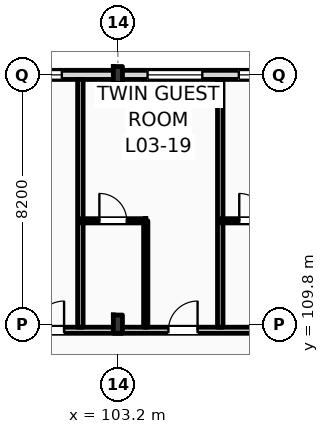
"""IFC4 building model, lengths in metres.
Left out: names, types, materials, properties, quantities, classifications, styles, units other than length and angle.
Written with IfcOpenShell. Run it as: python <this file> out.ifc"""

import sys

from ifc_helpers import new_model, si_unit, direction, frame, frame_2d, origin, origin_2d, place, context, subcontext, project, spatial, rectangle, i_section, extrude, element, fill, save


model = new_model("IFC4")
c1 = context("Model", 3, precision=1e-05, world=origin(), true_north=direction((0.0, 1.0)))
c2 = subcontext(c1, "Body", "Model", "MODEL_VIEW")
j1 = project(units=[si_unit("LENGTHUNIT", "METRE"), si_unit("PLANEANGLEUNIT", "RADIAN")], contexts=[c1])
p1 = place(None, origin())
s1 = spatial("IfcSite", under=j1, at=p1, CompositionType="ELEMENT")
p2 = place(p1, origin())
s2 = spatial("IfcBuilding", under=s1, at=p2, CompositionType="ELEMENT")
p3 = place(p2, frame((0.0, 0.0, 16.2)))
s3 = spatial("IfcBuildingStorey", under=s2, at=p3, CompositionType="ELEMENT", Elevation=16.2)
p4 = place(p3, frame((103.2, 109.8, 0.0), z_axis=(0.0, 0.0, 1.0), x_axis=(1.0, 0.0, 0.0)))
e1 = element("IfcColumn", 1, at=p4, inside=s3, PredefinedType="COLUMN", context=c2, shape_type="SweptSolid", body=[
    extrude(i_section(OverallWidth=0.3, OverallDepth=0.6, WebThickness=0.015, FlangeThickness=0.03, FilletRadius=0.027, at=origin_2d()), origin(), (0.0, 0.0, 1.0), 4.2),
])
p5 = place(p3, frame((103.2, 118.0, 0.0), z_axis=(0.0, 0.0, 1.0), x_axis=(1.0, 0.0, 0.0)))
e2 = element("IfcColumn", 2, at=p5, inside=s3, PredefinedType="COLUMN", context=c2, shape_type="SweptSolid", body=[
    extrude(i_section(OverallWidth=0.3, OverallDepth=0.55, WebThickness=0.015, FlangeThickness=0.029, FilletRadius=0.027, at=origin_2d()), origin(), (0.0, 0.0, 1.0), 4.2),
])
p6 = place(p3, frame((22.5, 118.0, 0.0), z_axis=(0.0, 0.0, 1.0), x_axis=(1.0, 0.0, 0.0)))
e3 = element("IfcWall", 3, at=p6, inside=s3, PredefinedType="STANDARD", context=c2, shape_type="SweptSolid", body=[
    extrude(rectangle(XDim=97.5, YDim=0.3, at=frame_2d((48.75, 0.0))), origin(), (0.0, 0.0, 1.0), 3.36),
])
p7 = place(p6, frame((3.721, 0.0, 0.9)))
e4 = element("IfcOpeningElement", 4, at=p7, cuts=e3, PredefinedType="OPENING", context=c2, shape_type="SweptSolid", body=[
    extrude(rectangle(XDim=0.9, YDim=1.8, at=frame_2d((0.45, 0.9))), frame((0.0, 0.16, 0.0), z_axis=(0.0, -1.0, 0.0), x_axis=(1.0, 0.0, 0.0)), (0.0, 0.0, 1.0), 0.32),
])
p8 = place(p6, frame((6.447, 0.0, 0.9)))
e5 = element("IfcOpeningElement", 5, at=p8, cuts=e3, PredefinedType="OPENING", context=c2, shape_type="SweptSolid", body=[
    extrude(rectangle(XDim=1.35, YDim=1.85, at=frame_2d((0.675, 0.925))), frame((0.0, 0.16, 0.0), z_axis=(0.0, -1.0, 0.0), x_axis=(1.0, 0.0, 0.0)), (0.0, 0.0, 1.0), 0.32),
])
p9 = place(p6, frame((11.363, 0.0, 0.9)))
e6 = element("IfcOpeningElement", 6, at=p9, cuts=e3, PredefinedType="OPENING", context=c2, shape_type="SweptSolid", body=[
    extrude(rectangle(XDim=1.5, YDim=1.9, at=frame_2d((0.75, 0.95))), frame((0.0, 0.16, 0.0), z_axis=(0.0, -1.0, 0.0), x_axis=(1.0, 0.0, 0.0)), (0.0, 0.0, 1.0), 0.32),
])
p10 = place(p6, frame((15.078, 0.0, 0.9)))
e7 = element("IfcOpeningElement", 7, at=p10, cuts=e3, PredefinedType="OPENING", context=c2, shape_type="SweptSolid", body=[
    extrude(rectangle(XDim=1.65, YDim=1.95, at=frame_2d((0.825, 0.975))), frame((0.0, 0.16, 0.0), z_axis=(0.0, -1.0, 0.0), x_axis=(1.0, 0.0, 0.0)), (0.0, 0.0, 1.0), 0.32),
])
p11 = place(p6, frame((19.395, 0.0, 0.9)))
e8 = element("IfcOpeningElement", 8, at=p11, cuts=e3, PredefinedType="OPENING", context=c2, shape_type="SweptSolid", body=[
    extrude(rectangle(XDim=1.8, YDim=2.0, at=frame_2d((0.9, 1.0))), frame((0.0, 0.16, 0.0), z_axis=(0.0, -1.0, 0.0), x_axis=(1.0, 0.0, 0.0)), (0.0, 0.0, 1.0), 0.32),
])
p12 = place(p6, frame((23.31, 0.0, 0.9)))
e9 = element("IfcOpeningElement", 9, at=p12, cuts=e3, PredefinedType="OPENING", context=c2, shape_type="SweptSolid", body=[
    extrude(rectangle(XDim=1.95, YDim=2.05, at=frame_2d((0.975, 1.025))), frame((0.0, 0.16, 0.0), z_axis=(0.0, -1.0, 0.0), x_axis=(1.0, 0.0, 0.0)), (0.0, 0.0, 1.0), 0.32),
])
p13 = place(p6, frame((28.026, 0.0, 0.9)))
e10 = element("IfcOpeningElement", 10, at=p13, cuts=e3, PredefinedType="OPENING", context=c2, shape_type="SweptSolid", body=[
    extrude(rectangle(XDim=2.1, YDim=2.1, at=frame_2d((1.05, 1.05))), frame((0.0, 0.16, 0.0), z_axis=(0.0, -1.0, 0.0), x_axis=(1.0, 0.0, 0.0)), (0.0, 0.0, 1.0), 0.32),
])
p14 = place(p6, frame((31.941, 0.0, 0.9)))
e11 = element("IfcOpeningElement", 11, at=p14, cuts=e3, PredefinedType="OPENING", context=c2, shape_type="SweptSolid", body=[
    extrude(rectangle(XDim=1.1, YDim=2.15, at=frame_2d((0.55, 1.075))), frame((0.0, 0.16, 0.0), z_axis=(0.0, -1.0, 0.0), x_axis=(1.0, 0.0, 0.0)), (0.0, 0.0, 1.0), 0.32),
])
p15 = place(p6, frame((36.657, 0.0, 0.9)))
e12 = element("IfcOpeningElement", 12, at=p15, cuts=e3, PredefinedType="OPENING", context=c2, shape_type="SweptSolid", body=[
    extrude(rectangle(XDim=2.4, YDim=2.2, at=frame_2d((1.2, 1.1))), frame((0.0, 0.16, 0.0), z_axis=(0.0, -1.0, 0.0), x_axis=(1.0, 0.0, 0.0)), (0.0, 0.0, 1.0), 0.32),
])
p16 = place(p6, frame((42.574, 0.0, 0.9)))
e13 = element("IfcOpeningElement", 13, at=p16, cuts=e3, PredefinedType="OPENING", context=c2, shape_type="SweptSolid", body=[
    extrude(rectangle(XDim=1.35, YDim=2.25, at=frame_2d((0.675, 1.125))), frame((0.0, 0.16, 0.0), z_axis=(0.0, -1.0, 0.0), x_axis=(1.0, 0.0, 0.0)), (0.0, 0.0, 1.0), 0.32),
])
p17 = place(p6, frame((45.289, 0.0, 0.9)))
e14 = element("IfcOpeningElement", 14, at=p17, cuts=e3, PredefinedType="OPENING", context=c2, shape_type="SweptSolid", body=[
    extrude(rectangle(XDim=2.7, YDim=2.28, at=frame_2d((1.35, 1.14))), frame((0.0, 0.16, 0.0), z_axis=(0.0, -1.0, 0.0), x_axis=(1.0, 0.0, 0.0)), (0.0, 0.0, 1.0), 0.32),
])
p18 = place(p6, frame((50.406, 0.0, 0.9)))
e15 = element("IfcOpeningElement", 15, at=p18, cuts=e3, PredefinedType="OPENING", context=c2, shape_type="SweptSolid", body=[
    extrude(rectangle(XDim=1.8, YDim=2.28, at=frame_2d((0.9, 1.14))), frame((0.0, 0.16, 0.0), z_axis=(0.0, -1.0, 0.0), x_axis=(1.0, 0.0, 0.0)), (0.0, 0.0, 1.0), 0.32),
])
p19 = place(p6, frame((53.922, 0.0, 0.9)))
e16 = element("IfcOpeningElement", 16, at=p19, cuts=e3, PredefinedType="OPENING", context=c2, shape_type="SweptSolid", body=[
    extrude(rectangle(XDim=1.8, YDim=2.28, at=frame_2d((0.9, 1.14))), frame((0.0, 0.16, 0.0), z_axis=(0.0, -1.0, 0.0), x_axis=(1.0, 0.0, 0.0)), (0.0, 0.0, 1.0), 0.32),
])
p20 = place(p6, frame((58.332, 0.0, 0.9)))
e17 = element("IfcOpeningElement", 17, at=p20, cuts=e3, PredefinedType="OPENING", context=c2, shape_type="SweptSolid", body=[
    extrude(rectangle(XDim=2.961, YDim=2.28, at=frame_2d((1.48, 1.14))), frame((0.0, 0.16, 0.0), z_axis=(0.0, -1.0, 0.0), x_axis=(1.0, 0.0, 0.0)), (0.0, 0.0, 1.0), 0.32),
])
p21 = place(p6, frame((62.513, 0.0, 0.9)))
e18 = element("IfcOpeningElement", 18, at=p21, cuts=e3, PredefinedType="OPENING", context=c2, shape_type="SweptSolid", body=[
    extrude(rectangle(XDim=1.8, YDim=2.28, at=frame_2d((0.9, 1.14))), frame((0.0, 0.16, 0.0), z_axis=(0.0, -1.0, 0.0), x_axis=(1.0, 0.0, 0.0)), (0.0, 0.0, 1.0), 0.32),
])
p22 = place(p6, frame((67.114, 0.0, 0.9)))
e19 = element("IfcOpeningElement", 19, at=p22, cuts=e3, PredefinedType="OPENING", context=c2, shape_type="SweptSolid", body=[
    extrude(rectangle(XDim=2.961, YDim=2.28, at=frame_2d((1.48, 1.14))), frame((0.0, 0.16, 0.0), z_axis=(0.0, -1.0, 0.0), x_axis=(1.0, 0.0, 0.0)), (0.0, 0.0, 1.0), 0.32),
])
p23 = place(p6, frame((73.695, 0.0, 0.9)))
e20 = element("IfcOpeningElement", 20, at=p23, cuts=e3, PredefinedType="OPENING", context=c2, shape_type="SweptSolid", body=[
    extrude(rectangle(XDim=1.1, YDim=2.28, at=frame_2d((0.55, 1.14))), frame((0.0, 0.16, 0.0), z_axis=(0.0, -1.0, 0.0), x_axis=(1.0, 0.0, 0.0)), (0.0, 0.0, 1.0), 0.32),
])
p24 = place(p6, frame((75.895, 0.0, 0.9)))
e21 = element("IfcOpeningElement", 21, at=p24, cuts=e3, PredefinedType="OPENING", context=c2, shape_type="SweptSolid", body=[
    extrude(rectangle(XDim=2.961, YDim=2.28, at=frame_2d((1.48, 1.14))), frame((0.0, 0.16, 0.0), z_axis=(0.0, -1.0, 0.0), x_axis=(1.0, 0.0, 0.0)), (0.0, 0.0, 1.0), 0.32),
])
p25 = place(p6, frame((81.676, 0.0, 0.9)))
e22 = element("IfcOpeningElement", 22, at=p25, cuts=e3, PredefinedType="OPENING", context=c2, shape_type="SweptSolid", body=[
    extrude(rectangle(XDim=1.8, YDim=2.28, at=frame_2d((0.9, 1.14))), frame((0.0, 0.16, 0.0), z_axis=(0.0, -1.0, 0.0), x_axis=(1.0, 0.0, 0.0)), (0.0, 0.0, 1.0), 0.32),
])
p26 = place(p6, frame((84.677, 0.0, 0.9)))
e23 = element("IfcOpeningElement", 23, at=p26, cuts=e3, PredefinedType="OPENING", context=c2, shape_type="SweptSolid", body=[
    extrude(rectangle(XDim=2.961, YDim=2.28, at=frame_2d((1.48, 1.14))), frame((0.0, 0.16, 0.0), z_axis=(0.0, -1.0, 0.0), x_axis=(1.0, 0.0, 0.0)), (0.0, 0.0, 1.0), 0.32),
])
p27 = place(p6, frame((89.999, 0.0, 0.9)))
e24 = element("IfcOpeningElement", 24, at=p27, cuts=e3, PredefinedType="OPENING", context=c2, shape_type="SweptSolid", body=[
    extrude(rectangle(XDim=1.1, YDim=1.5, at=frame_2d((0.55, 0.75))), frame((0.0, 0.16, 0.0), z_axis=(0.0, -1.0, 0.0), x_axis=(1.0, 0.0, 0.0)), (0.0, 0.0, 1.0), 0.32),
])
p28 = place(p6, frame((94.35, 0.0, 0.9)))
e25 = element("IfcOpeningElement", 25, at=p28, cuts=e3, PredefinedType="OPENING", context=c2, shape_type="SweptSolid", body=[
    extrude(rectangle(XDim=1.25, YDim=1.6, at=frame_2d((0.625, 0.8))), frame((0.0, 0.16, 0.0), z_axis=(0.0, -1.0, 0.0), x_axis=(1.0, 0.0, 0.0)), (0.0, 0.0, 1.0), 0.32),
])
p29 = place(p3, frame((10.65, 109.6, 0.0), z_axis=(0.0, 0.0, 1.0), x_axis=(1.0, 0.0, 0.0)))
e26 = element("IfcWall", 26, at=p29, inside=s3, PredefinedType="PARTITIONING", context=c2, shape_type="SweptSolid", body=[
    extrude(rectangle(XDim=109.21, YDim=0.2, at=frame_2d((54.605, 0.0))), origin(), (0.0, 0.0, 1.0), 3.36),
])
p30 = place(p29, frame((15.43, 0.0, 0.0)))
e27 = element("IfcOpeningElement", 27, at=p30, cuts=e26, PredefinedType="OPENING", context=c2, shape_type="SweptSolid", body=[
    extrude(rectangle(XDim=1.02, YDim=2.2, at=frame_2d((0.51, 1.1))), frame((0.0, 0.11, 0.0), z_axis=(0.0, -1.0, 0.0), x_axis=(1.0, 0.0, 0.0)), (0.0, 0.0, 1.0), 0.22),
])
p31 = place(p29, frame((19.537, 0.0, 0.0)))
e28 = element("IfcOpeningElement", 28, at=p31, cuts=e26, PredefinedType="OPENING", context=c2, shape_type="SweptSolid", body=[
    extrude(rectangle(XDim=1.02, YDim=2.2, at=frame_2d((0.51, 1.1))), frame((0.0, 0.11, 0.0), z_axis=(0.0, -1.0, 0.0), x_axis=(1.0, 0.0, 0.0)), (0.0, 0.0, 1.0), 0.22),
])
p32 = place(p29, frame((23.928, 0.0, 0.0)))
e29 = element("IfcOpeningElement", 29, at=p32, cuts=e26, PredefinedType="OPENING", context=c2, shape_type="SweptSolid", body=[
    extrude(rectangle(XDim=1.02, YDim=2.2, at=frame_2d((0.51, 1.1))), frame((0.0, 0.11, 0.0), z_axis=(0.0, -1.0, 0.0), x_axis=(1.0, 0.0, 0.0)), (0.0, 0.0, 1.0), 0.22),
])
p33 = place(p29, frame((26.169, 0.0, 0.0)))
e30 = element("IfcOpeningElement", 30, at=p33, cuts=e26, PredefinedType="OPENING", context=c2, shape_type="SweptSolid", body=[
    extrude(rectangle(XDim=1.02, YDim=2.2, at=frame_2d((0.51, 1.1))), frame((0.0, 0.11, 0.0), z_axis=(0.0, -1.0, 0.0), x_axis=(1.0, 0.0, 0.0)), (0.0, 0.0, 1.0), 0.22),
])
p34 = place(p29, frame((32.739, 0.0, 0.0)))
e31 = element("IfcOpeningElement", 31, at=p34, cuts=e26, PredefinedType="OPENING", context=c2, shape_type="SweptSolid", body=[
    extrude(rectangle(XDim=0.96, YDim=2.2, at=frame_2d((0.48, 1.1))), frame((0.0, 0.11, 0.0), z_axis=(0.0, -1.0, 0.0), x_axis=(1.0, 0.0, 0.0)), (0.0, 0.0, 1.0), 0.22),
])
p35 = place(p29, frame((34.98, 0.0, 0.0)))
e32 = element("IfcOpeningElement", 32, at=p35, cuts=e26, PredefinedType="OPENING", context=c2, shape_type="SweptSolid", body=[
    extrude(rectangle(XDim=0.96, YDim=2.2, at=frame_2d((0.48, 1.1))), frame((0.0, 0.11, 0.0), z_axis=(0.0, -1.0, 0.0), x_axis=(1.0, 0.0, 0.0)), (0.0, 0.0, 1.0), 0.22),
])
p36 = place(p29, frame((41.521, 0.0, 0.0)))
e33 = element("IfcOpeningElement", 33, at=p36, cuts=e26, PredefinedType="OPENING", context=c2, shape_type="SweptSolid", body=[
    extrude(rectangle(XDim=0.96, YDim=2.2, at=frame_2d((0.48, 1.1))), frame((0.0, 0.11, 0.0), z_axis=(0.0, -1.0, 0.0), x_axis=(1.0, 0.0, 0.0)), (0.0, 0.0, 1.0), 0.22),
])
p37 = place(p29, frame((43.512, 0.0, 0.0)))
e34 = element("IfcOpeningElement", 34, at=p37, cuts=e26, PredefinedType="OPENING", context=c2, shape_type="SweptSolid", body=[
    extrude(rectangle(XDim=0.96, YDim=2.2, at=frame_2d((0.48, 1.1))), frame((0.0, 0.11, 0.0), z_axis=(0.0, -1.0, 0.0), x_axis=(1.0, 0.0, 0.0)), (0.0, 0.0, 1.0), 0.22),
])
p38 = place(p29, frame((50.303, 0.0, 0.0)))
e35 = element("IfcOpeningElement", 35, at=p38, cuts=e26, PredefinedType="OPENING", context=c2, shape_type="SweptSolid", body=[
    extrude(rectangle(XDim=0.96, YDim=2.2, at=frame_2d((0.48, 1.1))), frame((0.0, 0.11, 0.0), z_axis=(0.0, -1.0, 0.0), x_axis=(1.0, 0.0, 0.0)), (0.0, 0.0, 1.0), 0.22),
])
p39 = place(p29, frame((54.944, 0.0, 0.0)))
e36 = element("IfcOpeningElement", 36, at=p39, cuts=e26, PredefinedType="OPENING", context=c2, shape_type="SweptSolid", body=[
    extrude(rectangle(XDim=0.96, YDim=2.2, at=frame_2d((0.48, 1.1))), frame((0.0, 0.11, 0.0), z_axis=(0.0, -1.0, 0.0), x_axis=(1.0, 0.0, 0.0)), (0.0, 0.0, 1.0), 0.22),
])
p40 = place(p29, frame((59.085, 0.0, 0.0)))
e37 = element("IfcOpeningElement", 37, at=p40, cuts=e26, PredefinedType="OPENING", context=c2, shape_type="SweptSolid", body=[
    extrude(rectangle(XDim=0.96, YDim=2.2, at=frame_2d((0.48, 1.1))), frame((0.0, 0.11, 0.0), z_axis=(0.0, -1.0, 0.0), x_axis=(1.0, 0.0, 0.0)), (0.0, 0.0, 1.0), 0.22),
])
p41 = place(p29, frame((63.476, 0.0, 0.0)))
e38 = element("IfcOpeningElement", 38, at=p41, cuts=e26, PredefinedType="OPENING", context=c2, shape_type="SweptSolid", body=[
    extrude(rectangle(XDim=0.96, YDim=2.2, at=frame_2d((0.48, 1.1))), frame((0.0, 0.11, 0.0), z_axis=(0.0, -1.0, 0.0), x_axis=(1.0, 0.0, 0.0)), (0.0, 0.0, 1.0), 0.22),
])
p42 = place(p29, frame((65.716, 0.0, 0.0)))
e39 = element("IfcOpeningElement", 39, at=p42, cuts=e26, PredefinedType="OPENING", context=c2, shape_type="SweptSolid", body=[
    extrude(rectangle(XDim=0.96, YDim=2.2, at=frame_2d((0.48, 1.1))), frame((0.0, 0.11, 0.0), z_axis=(0.0, -1.0, 0.0), x_axis=(1.0, 0.0, 0.0)), (0.0, 0.0, 1.0), 0.22),
])
p43 = place(p29, frame((72.257, 0.0, 0.0)))
e40 = element("IfcOpeningElement", 40, at=p43, cuts=e26, PredefinedType="OPENING", context=c2, shape_type="SweptSolid", body=[
    extrude(rectangle(XDim=0.96, YDim=2.2, at=frame_2d((0.48, 1.1))), frame((0.0, 0.11, 0.0), z_axis=(0.0, -1.0, 0.0), x_axis=(1.0, 0.0, 0.0)), (0.0, 0.0, 1.0), 0.22),
])
p44 = place(p29, frame((74.498, 0.0, 0.0)))
e41 = element("IfcOpeningElement", 41, at=p44, cuts=e26, PredefinedType="OPENING", context=c2, shape_type="SweptSolid", body=[
    extrude(rectangle(XDim=0.96, YDim=2.2, at=frame_2d((0.48, 1.1))), frame((0.0, 0.11, 0.0), z_axis=(0.0, -1.0, 0.0), x_axis=(1.0, 0.0, 0.0)), (0.0, 0.0, 1.0), 0.22),
])
p45 = place(p29, frame((81.039, 0.0, 0.0)))
e42 = element("IfcOpeningElement", 42, at=p45, cuts=e26, PredefinedType="OPENING", context=c2, shape_type="SweptSolid", body=[
    extrude(rectangle(XDim=0.96, YDim=2.2, at=frame_2d((0.48, 1.1))), frame((0.0, 0.11, 0.0), z_axis=(0.0, -1.0, 0.0), x_axis=(1.0, 0.0, 0.0)), (0.0, 0.0, 1.0), 0.22),
])
p46 = place(p29, frame((85.68, 0.0, 0.0)))
e43 = element("IfcOpeningElement", 43, at=p46, cuts=e26, PredefinedType="OPENING", context=c2, shape_type="SweptSolid", body=[
    extrude(rectangle(XDim=0.96, YDim=2.2, at=frame_2d((0.48, 1.1))), frame((0.0, 0.11, 0.0), z_axis=(0.0, -1.0, 0.0), x_axis=(1.0, 0.0, 0.0)), (0.0, 0.0, 1.0), 0.22),
])
p47 = place(p29, frame((89.82, 0.0, 0.0)))
e44 = element("IfcOpeningElement", 44, at=p47, cuts=e26, PredefinedType="OPENING", context=c2, shape_type="SweptSolid", body=[
    extrude(rectangle(XDim=0.96, YDim=2.2, at=frame_2d((0.48, 1.1))), frame((0.0, 0.11, 0.0), z_axis=(0.0, -1.0, 0.0), x_axis=(1.0, 0.0, 0.0)), (0.0, 0.0, 1.0), 0.22),
])
p48 = place(p29, frame((94.211, 0.0, 0.0)))
e45 = element("IfcOpeningElement", 45, at=p48, cuts=e26, PredefinedType="OPENING", context=c2, shape_type="SweptSolid", body=[
    extrude(rectangle(XDim=0.96, YDim=2.2, at=frame_2d((0.48, 1.1))), frame((0.0, 0.11, 0.0), z_axis=(0.0, -1.0, 0.0), x_axis=(1.0, 0.0, 0.0)), (0.0, 0.0, 1.0), 0.22),
])
p49 = place(p29, frame((98.602, 0.0, 0.0)))
e46 = element("IfcOpeningElement", 46, at=p49, cuts=e26, PredefinedType="OPENING", context=c2, shape_type="SweptSolid", body=[
    extrude(rectangle(XDim=0.96, YDim=2.2, at=frame_2d((0.48, 1.1))), frame((0.0, 0.11, 0.0), z_axis=(0.0, -1.0, 0.0), x_axis=(1.0, 0.0, 0.0)), (0.0, 0.0, 1.0), 0.22),
])
p50 = place(p29, frame((102.993, 0.0, 0.0)))
e47 = element("IfcOpeningElement", 47, at=p50, cuts=e26, PredefinedType="OPENING", context=c2, shape_type="SweptSolid", body=[
    extrude(rectangle(XDim=0.96, YDim=2.2, at=frame_2d((0.48, 1.1))), frame((0.0, 0.11, 0.0), z_axis=(0.0, -1.0, 0.0), x_axis=(1.0, 0.0, 0.0)), (0.0, 0.0, 1.0), 0.22),
])
p51 = place(p29, frame((105.269, 0.0, 0.0)))
e48 = element("IfcOpeningElement", 48, at=p51, cuts=e26, PredefinedType="OPENING", context=c2, shape_type="SweptSolid", body=[
    extrude(rectangle(XDim=0.96, YDim=2.2, at=frame_2d((0.48, 1.1))), frame((0.0, 0.11, 0.0), z_axis=(0.0, -1.0, 0.0), x_axis=(1.0, 0.0, 0.0)), (0.0, 0.0, 1.0), 0.22),
])
p52 = place(p29, frame((2.716, 0.0, 0.0)))
e49 = element("IfcOpeningElement", 49, at=p52, cuts=e26, PredefinedType="OPENING", context=c2, shape_type="SweptSolid", body=[
    extrude(rectangle(XDim=1.35, YDim=2.25, at=frame_2d((0.675, 1.125))), frame((0.0, 0.11, 0.0), z_axis=(0.0, -1.0, 0.0), x_axis=(1.0, 0.0, 0.0)), (0.0, 0.0, 1.0), 0.22),
])
p53 = place(p29, frame((6.65, 0.0, 0.0)))
e50 = element("IfcOpeningElement", 50, at=p53, cuts=e26, PredefinedType="OPENING", context=c2, shape_type="SweptSolid", body=[
    extrude(rectangle(XDim=1.35, YDim=2.25, at=frame_2d((0.675, 1.125))), frame((0.0, 0.11, 0.0), z_axis=(0.0, -1.0, 0.0), x_axis=(1.0, 0.0, 0.0)), (0.0, 0.0, 1.0), 0.22),
])
p54 = place(p29, frame((10.583, 0.0, 0.0)))
e51 = element("IfcOpeningElement", 51, at=p54, cuts=e26, PredefinedType="OPENING", context=c2, shape_type="SweptSolid", body=[
    extrude(rectangle(XDim=1.35, YDim=2.25, at=frame_2d((0.675, 1.125))), frame((0.0, 0.11, 0.0), z_axis=(0.0, -1.0, 0.0), x_axis=(1.0, 0.0, 0.0)), (0.0, 0.0, 1.0), 0.22),
])
for number, where, z_axis, x_axis in (
    (52, (101.966, 109.7, 0.0), (0.0, 0.0, 1.0), (0.0, 1.0, 0.0)),
    (53, (106.567, 109.7, 0.0), (0.0, 0.0, 1.0), (0.0, 1.0, 0.0)),
):
    element("IfcWall", number, at=place(p3, frame(where, z_axis=z_axis, x_axis=x_axis)), inside=s3, PredefinedType="PARTITIONING", context=c2, shape_type="SweptSolid", body=[
        extrude(rectangle(XDim=8.15, YDim=0.18, at=frame_2d((4.075, 0.0))), origin(), (0.0, 0.0, 1.0), 3.92),
    ])
p55 = place(p3, frame((104.116, 109.7, 0.0), z_axis=(0.0, 0.0, 1.0), x_axis=(0.0, 1.0, 0.0)))
e54 = element("IfcWall", 54, at=p55, inside=s3, PredefinedType="PARTITIONING", context=c2, shape_type="SweptSolid", body=[
    extrude(rectangle(XDim=3.5, YDim=0.14, at=frame_2d((1.75, 0.0))), origin(), (0.0, 0.0, 1.0), 3.92),
])
p56 = place(p3, frame((101.966, 113.2, 0.0), z_axis=(0.0, 0.0, 1.0), x_axis=(1.0, 0.0, 0.0)))
e55 = element("IfcWall", 55, at=p56, inside=s3, PredefinedType="PARTITIONING", context=c2, shape_type="SweptSolid", body=[
    extrude(rectangle(XDim=2.15, YDim=0.14, at=frame_2d((1.075, 0.0))), origin(), (0.0, 0.0, 1.0), 3.92),
])
p57 = place(p56, frame((0.625, 0.0, 0.0)))
e56 = element("IfcOpeningElement", 56, at=p57, cuts=e55, PredefinedType="OPENING", context=c2, shape_type="SweptSolid", body=[
    extrude(rectangle(XDim=0.9, YDim=2.1, at=frame_2d((0.45, 1.05))), frame((0.0, 0.08, 0.0), z_axis=(0.0, -1.0, 0.0), x_axis=(1.0, 0.0, 0.0)), (0.0, 0.0, 1.0), 0.16),
])
p58 = place(p3, frame((106.567, 113.2, 0.0), z_axis=(0.0, 0.0, 1.0), x_axis=(1.0, 0.0, 0.0)))
e57 = element("IfcWall", 57, at=p58, inside=s3, PredefinedType="PARTITIONING", context=c2, shape_type="SweptSolid", body=[
    extrude(rectangle(XDim=2.15, YDim=0.14, at=frame_2d((1.075, 0.0))), origin(), (0.0, 0.0, 1.0), 3.92),
])
p59 = place(p58, frame((0.625, 0.0, 0.0)))
e58 = element("IfcOpeningElement", 58, at=p59, cuts=e57, PredefinedType="OPENING", context=c2, shape_type="SweptSolid", body=[
    extrude(rectangle(XDim=0.9, YDim=2.1, at=frame_2d((0.45, 1.05))), frame((0.0, 0.08, 0.0), z_axis=(0.0, -1.0, 0.0), x_axis=(1.0, 0.0, 0.0)), (0.0, 0.0, 1.0), 0.16),
])
p60 = place(p24, origin())
e59 = element("IfcWindow", 59, at=p60, inside=s3, PartitioningType="DOUBLE_PANEL_VERTICAL", PredefinedType="WINDOW", context=c2, shape_type="SweptSolid", body=[
    extrude(rectangle(XDim=2.961, YDim=2.28, at=frame_2d((1.48, 1.14))), frame((0.0, 0.03, 0.0), z_axis=(0.0, -1.0, 0.0), x_axis=(1.0, 0.0, 0.0)), (0.0, 0.0, 1.0), 0.06),
])
fill(e21, e59)
p61 = place(p25, origin())
e60 = element("IfcWindow", 60, at=p61, inside=s3, PartitioningType="DOUBLE_PANEL_VERTICAL", PredefinedType="WINDOW", context=c2, shape_type="SweptSolid", body=[
    extrude(rectangle(XDim=1.8, YDim=2.28, at=frame_2d((0.9, 1.14))), frame((0.0, 0.03, 0.0), z_axis=(0.0, -1.0, 0.0), x_axis=(1.0, 0.0, 0.0)), (0.0, 0.0, 1.0), 0.06),
])
fill(e22, e60)
p62 = place(p26, origin())
e61 = element("IfcWindow", 61, at=p62, inside=s3, PartitioningType="DOUBLE_PANEL_VERTICAL", PredefinedType="WINDOW", context=c2, shape_type="SweptSolid", body=[
    extrude(rectangle(XDim=2.961, YDim=2.28, at=frame_2d((1.48, 1.14))), frame((0.0, 0.03, 0.0), z_axis=(0.0, -1.0, 0.0), x_axis=(1.0, 0.0, 0.0)), (0.0, 0.0, 1.0), 0.06),
])
fill(e23, e61)
p63 = place(p47, origin())
e62 = element("IfcDoor", 62, at=p63, inside=s3, OperationType="SINGLE_SWING_RIGHT", PredefinedType="DOOR", context=c2, shape_type="SweptSolid", body=[
    extrude(rectangle(XDim=0.96, YDim=2.2, at=frame_2d((0.48, 1.1))), frame((0.0, 0.025, 0.0), z_axis=(0.0, -1.0, 0.0), x_axis=(1.0, 0.0, 0.0)), (0.0, 0.0, 1.0), 0.05),
])
fill(e44, e62)
p64 = place(p48, origin())
e63 = element("IfcDoor", 63, at=p64, inside=s3, OperationType="SINGLE_SWING_RIGHT", PredefinedType="DOOR", context=c2, shape_type="SweptSolid", body=[
    extrude(rectangle(XDim=0.96, YDim=2.2, at=frame_2d((0.48, 1.1))), frame((0.0, 0.025, 0.0), z_axis=(0.0, -1.0, 0.0), x_axis=(1.0, 0.0, 0.0)), (0.0, 0.0, 1.0), 0.05),
])
fill(e45, e63)
p65 = place(p57, origin())
e64 = element("IfcDoor", 64, at=p65, inside=s3, OperationType="SINGLE_SWING_LEFT", PredefinedType="DOOR", context=c2, shape_type="SweptSolid", body=[
    extrude(rectangle(XDim=0.9, YDim=2.1, at=frame_2d((0.45, 1.05))), frame((0.0, 0.025, 0.0), z_axis=(0.0, -1.0, 0.0), x_axis=(1.0, 0.0, 0.0)), (0.0, 0.0, 1.0), 0.05),
])
fill(e56, e64)
p66 = place(p59, origin())
e65 = element("IfcDoor", 65, at=p66, inside=s3, OperationType="SINGLE_SWING_LEFT", PredefinedType="DOOR", context=c2, shape_type="SweptSolid", body=[
    extrude(rectangle(XDim=0.9, YDim=2.1, at=frame_2d((0.45, 1.05))), frame((0.0, 0.025, 0.0), z_axis=(0.0, -1.0, 0.0), x_axis=(1.0, 0.0, 0.0)), (0.0, 0.0, 1.0), 0.05),
])
fill(e58, e65)
save(model, sys.argv[1])
